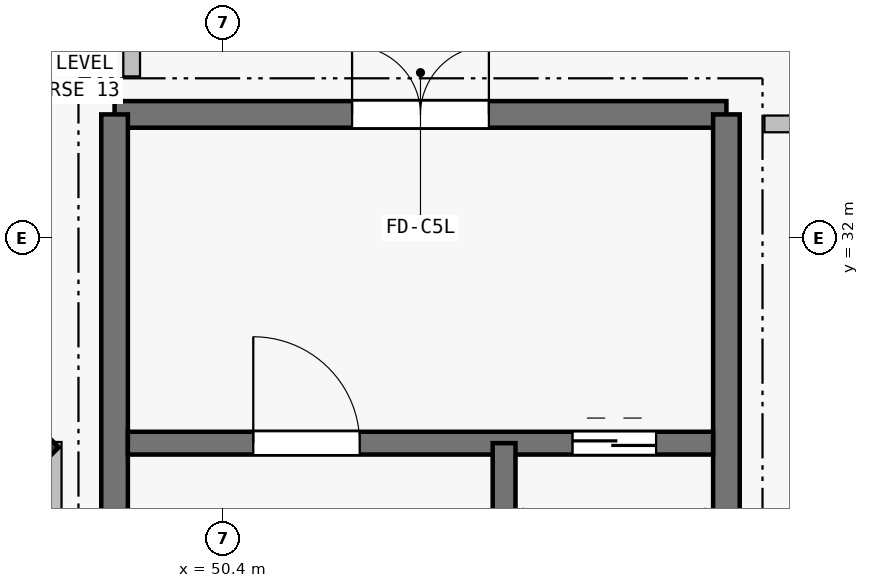
"""IFC4 building model, lengths in metres.
Left out: names, types, materials, properties, quantities, classifications, styles, units other than length and angle.
Written with IfcOpenShell. Run it as: python <this file> out.ifc"""

import sys

from ifc_helpers import new_model, si_unit, direction, frame, frame_2d, origin, origin_2d, place, context, subcontext, project, spatial, rectangle, extrude, element, fill, save


model = new_model("IFC4")
c1 = context("Model", 3, precision=1e-05, world=origin(), true_north=direction((0.0, 1.0)))
c2 = subcontext(c1, "Body", "Model", "MODEL_VIEW")
j1 = project(units=[si_unit("LENGTHUNIT", "METRE"), si_unit("PLANEANGLEUNIT", "RADIAN")], contexts=[c1])
p1 = place(None, origin())
s1 = spatial("IfcSite", under=j1, at=p1, CompositionType="ELEMENT")
p2 = place(p1, origin())
s2 = spatial("IfcBuilding", under=s1, at=p2, CompositionType="ELEMENT")
p3 = place(p2, origin())
s3 = spatial("IfcBuildingStorey", under=s2, at=p3, CompositionType="ELEMENT", Elevation=0.0)
p4 = place(p3, frame((47.569, 29.352, 0.0), z_axis=(0.0, 0.0, 1.0), x_axis=(-0.707106781187, -0.707106781187, 0.0)))
e1 = element("IfcColumn", 1, at=p4, inside=s3, PredefinedType="COLUMN", context=c2, shape_type="SweptSolid", body=[
    extrude(rectangle(XDim=0.8, YDim=1.1, at=origin_2d()), origin(), (0.0, 0.0, 1.0), 5.4),
])
p5 = place(p3, frame((48.975, 33.625, 0.0), z_axis=(0.0, 0.0, 1.0), x_axis=(1.0, 0.0, 0.0)))
e2 = element("IfcWall", 2, at=p5, inside=s3, PredefinedType="SHEAR", context=c2, shape_type="SweptSolid", body=[
    extrude(rectangle(XDim=8.05, YDim=0.35, at=frame_2d((4.025, 0.0))), origin(), (0.0, 0.0, 1.0), 5.4),
])
p6 = place(p5, frame((3.125, 0.0, 0.0)))
e3 = element("IfcOpeningElement", 3, at=p6, cuts=e2, PredefinedType="OPENING", context=c2, shape_type="SweptSolid", body=[
    extrude(rectangle(XDim=1.8, YDim=2.25, at=frame_2d((0.9, 1.125))), frame((0.0, 0.185, 0.0), z_axis=(0.0, -1.0, 0.0), x_axis=(1.0, 0.0, 0.0)), (0.0, 0.0, 1.0), 0.37),
])
p7 = place(p3, frame((48.975, 18.775, 0.0), z_axis=(0.0, 0.0, 1.0), x_axis=(0.0, 1.0, 0.0)))
e4 = element("IfcWall", 4, at=p7, inside=s3, PredefinedType="SHEAR", context=c2, shape_type="SweptSolid", body=[
    extrude(rectangle(XDim=14.85, YDim=0.35, at=frame_2d((7.425, 0.0))), origin(), (0.0, 0.0, 1.0), 5.4),
])
p8 = place(p3, frame((57.025, 18.775, 0.0), z_axis=(0.0, 0.0, 1.0), x_axis=(0.0, 1.0, 0.0)))
e5 = element("IfcWall", 5, at=p8, inside=s3, PredefinedType="SHEAR", context=c2, shape_type="SweptSolid", body=[
    extrude(rectangle(XDim=14.85, YDim=0.35, at=frame_2d((7.425, 0.0))), origin(), (0.0, 0.0, 1.0), 5.4),
])
p9 = place(p8, frame((2.855, 0.0, 0.0)))
e6 = element("IfcOpeningElement", 6, at=p9, cuts=e5, PredefinedType="OPENING", context=c2, shape_type="SweptSolid", body=[
    extrude(rectangle(XDim=0.9, YDim=2.1, at=frame_2d((0.45, 1.05))), frame((0.0, 0.185, 0.0), z_axis=(0.0, -1.0, 0.0), x_axis=(1.0, 0.0, 0.0)), (0.0, 0.0, 1.0), 0.37),
])
p10 = place(p3, frame((49.15, 29.3, 0.0), z_axis=(0.0, 0.0, 1.0), x_axis=(1.0, 0.0, 0.0)))
e7 = element("IfcWall", 7, at=p10, inside=s3, PredefinedType="SHEAR", context=c2, shape_type="SweptSolid", body=[
    extrude(rectangle(XDim=7.7, YDim=0.3, at=frame_2d((3.85, 0.0))), origin(), (0.0, 0.0, 1.0), 5.4),
])
p11 = place(p10, frame((1.65, 0.0, 0.0)))
e8 = element("IfcOpeningElement", 8, at=p11, cuts=e7, PredefinedType="OPENING", context=c2, shape_type="SweptSolid", body=[
    extrude(rectangle(XDim=1.4, YDim=2.2, at=frame_2d((0.7, 1.1))), frame((0.0, 0.16, 0.0), z_axis=(0.0, -1.0, 0.0), x_axis=(1.0, 0.0, 0.0)), (0.0, 0.0, 1.0), 0.32),
])
p12 = place(p10, frame((5.85, 0.0, 0.0)))
e9 = element("IfcOpeningElement", 9, at=p12, cuts=e7, PredefinedType="OPENING", context=c2, shape_type="SweptSolid", body=[
    extrude(rectangle(XDim=1.1, YDim=2.2, at=frame_2d((0.55, 1.1))), frame((0.0, 0.16, 0.0), z_axis=(0.0, -1.0, 0.0), x_axis=(1.0, 0.0, 0.0)), (0.0, 0.0, 1.0), 0.32),
])
p13 = place(p3, frame((54.1, 18.95, 0.0), z_axis=(0.0, 0.0, 1.0), x_axis=(0.0, 1.0, 0.0)))
e10 = element("IfcWall", 10, at=p13, inside=s3, PredefinedType="SHEAR", context=c2, shape_type="SweptSolid", body=[
    extrude(rectangle(XDim=10.35, YDim=0.3, at=frame_2d((5.175, 0.0))), origin(), (0.0, 0.0, 1.0), 5.4),
])
p14 = place(p3, frame((48.2, 29.315, 0.0), z_axis=(0.0, 0.0, 1.0), x_axis=(0.0, -1.0, 0.0)))
e11 = element("IfcWall", 11, at=p14, inside=s3, PredefinedType="PARTITIONING", context=c2, shape_type="SweptSolid", body=[
    extrude(rectangle(XDim=12.935, YDim=0.155, at=frame_2d((6.468, 0.0))), origin(), (0.0, 0.0, 1.0), 5.14),
])
p15 = place(p3, frame((61.32, 33.5, 0.0), z_axis=(0.0, 0.0, 1.0), x_axis=(-1.0, 0.0, 0.0)))
e12 = element("IfcWall", 12, at=p15, inside=s3, PredefinedType="SOLIDWALL", context=c2, shape_type="SweptSolid", body=[
    extrude(rectangle(XDim=3.795, YDim=0.22, at=frame_2d((1.897, 0.0))), origin(), (0.0, 0.0, 1.0), 4.315),
])
p16 = place(p3, frame((49.2, 34.125, 0.0), z_axis=(0.0, 0.0, 1.0), x_axis=(0.0, 1.0, 0.0)))
e13 = element("IfcWall", 13, at=p16, inside=s3, PredefinedType="SOLIDWALL", context=c2, shape_type="SweptSolid", body=[
    extrude(rectangle(XDim=1.995, YDim=0.22, at=frame_2d((0.998, 0.0))), origin(), (0.0, 0.0, 1.0), 5.14),
])
p17 = place(p6, origin())
e14 = element("IfcDoor", 14, at=p17, inside=s3, OperationType="DOUBLE_DOOR_SINGLE_SWING", PredefinedType="DOOR", context=c2, shape_type="SweptSolid", body=[
    extrude(rectangle(XDim=1.8, YDim=2.25, at=frame_2d((0.9, 1.125))), frame((0.0, 0.025, 0.0), z_axis=(0.0, -1.0, 0.0), x_axis=(1.0, 0.0, 0.0)), (0.0, 0.0, 1.0), 0.05),
])
fill(e3, e14)
p18 = place(p11, origin())
e15 = element("IfcDoor", 15, at=p18, inside=s3, OperationType="SINGLE_SWING_LEFT", PredefinedType="DOOR", context=c2, shape_type="SweptSolid", body=[
    extrude(rectangle(XDim=1.4, YDim=2.2, at=frame_2d((0.7, 1.1))), frame((0.0, 0.025, 0.0), z_axis=(0.0, -1.0, 0.0), x_axis=(1.0, 0.0, 0.0)), (0.0, 0.0, 1.0), 0.05),
])
fill(e8, e15)
p19 = place(p12, origin())
e16 = element("IfcDoor", 16, at=p19, inside=s3, OperationType="SLIDING_TO_LEFT", PredefinedType="DOOR", context=c2, shape_type="SweptSolid", body=[
    extrude(rectangle(XDim=1.1, YDim=2.2, at=frame_2d((0.55, 1.1))), frame((0.0, 0.025, 0.0), z_axis=(0.0, -1.0, 0.0), x_axis=(1.0, 0.0, 0.0)), (0.0, 0.0, 1.0), 0.05),
])
fill(e9, e16)
save(model, sys.argv[1])
